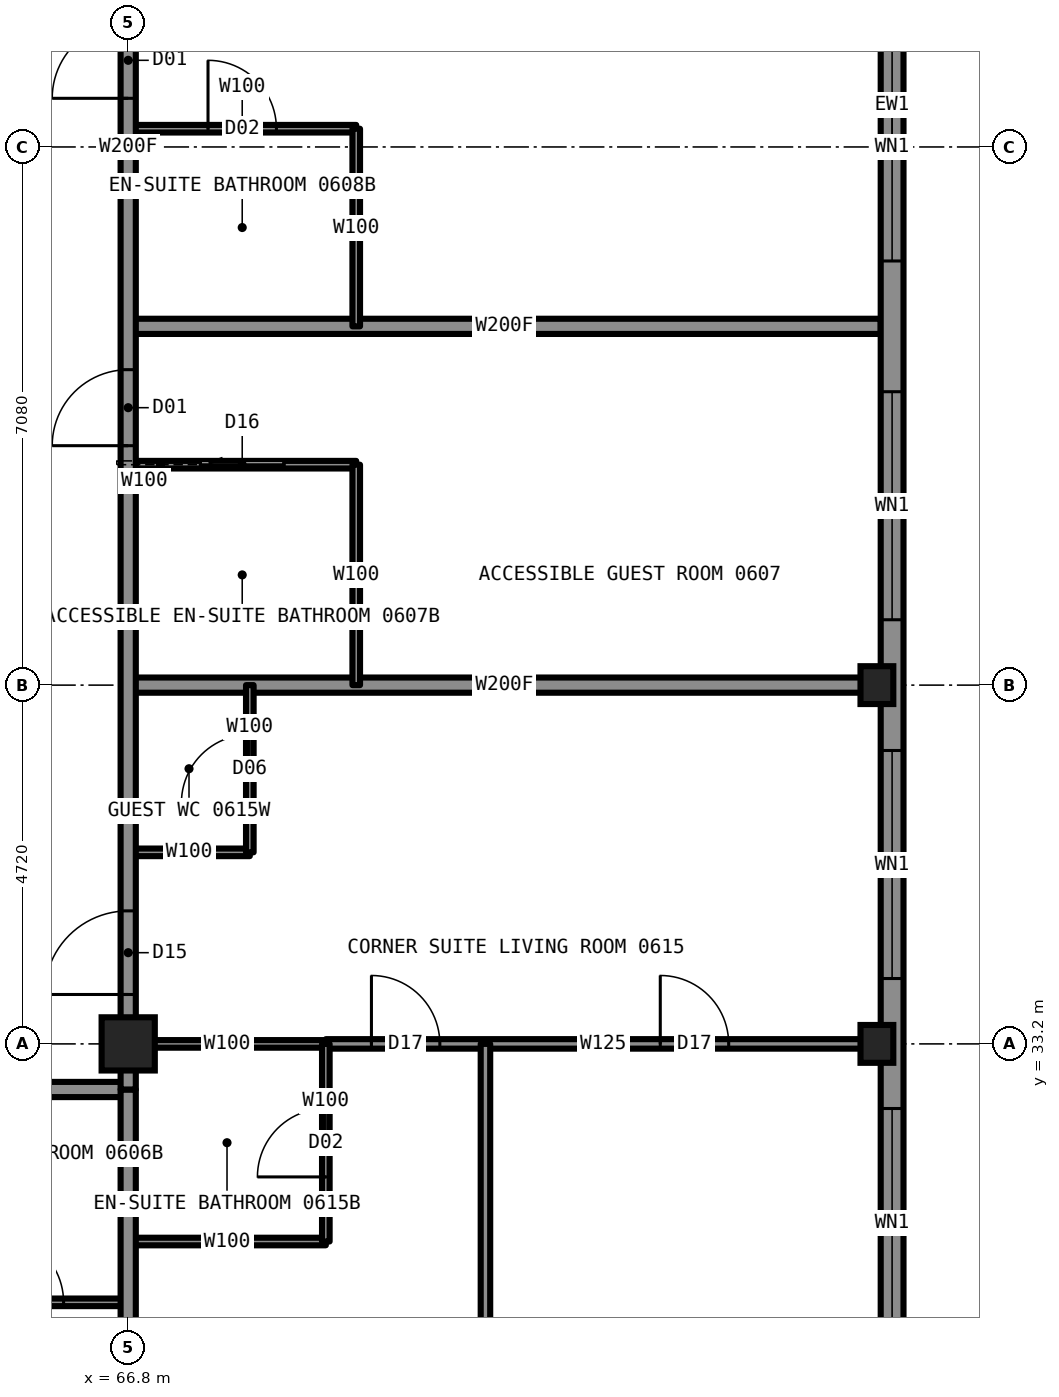
"""IFC4 building model, lengths in metres.
Left out: names, types, materials, properties, quantities, classifications, styles, units other than length and angle.
Written with IfcOpenShell. Run it as: python <this file> out.ifc"""

import sys

from ifc_helpers import new_model, si_unit, direction, frame, frame_2d, origin, origin_2d, place, context, subcontext, project, spatial, rectangle, hollow_rectangle, i_section, extrude, element, fill, save


model = new_model("IFC4")
c1 = context("Model", 3, precision=1e-05, world=origin(), true_north=direction((0.0, 1.0)))
c2 = subcontext(c1, "Body", "Model", "MODEL_VIEW")
j1 = project(units=[si_unit("LENGTHUNIT", "METRE"), si_unit("PLANEANGLEUNIT", "RADIAN")], contexts=[c1])
p1 = place(None, origin())
s1 = spatial("IfcSite", under=j1, at=p1, CompositionType="ELEMENT")
p2 = place(p1, origin())
s2 = spatial("IfcBuilding", under=s1, at=p2, CompositionType="ELEMENT")
p3 = place(p2, frame((0.0, 0.0, 28.5)))
s3 = spatial("IfcBuildingStorey", under=s2, at=p3, CompositionType="ELEMENT", Elevation=28.5)
for number, where, z_axis, x_axis in (
    (1, (76.65, 33.2, 0.0), (0.0, 0.0, 1.0), (1.0, 0.0, 0.0)),
    (2, (76.65, 37.92, 0.0), (0.0, 0.0, 1.0), (1.0, 0.0, 0.0)),
):
    element("IfcColumn", number, at=place(p3, frame(where, z_axis=z_axis, x_axis=x_axis)), inside=s3, PredefinedType="COLUMN", context=c2, shape_type="SweptSolid", body=[
        extrude(i_section(OverallWidth=0.432, OverallDepth=0.498, WebThickness=0.056, FlangeThickness=0.089, at=origin_2d()), origin(), (0.0, 0.0, 1.0), 3.5),
    ])
p4 = place(p3, frame((66.8, 33.2, 0.0), z_axis=(0.0, 0.0, 1.0), x_axis=(1.0, 0.0, 0.0)))
e3 = element("IfcColumn", 3, at=p4, inside=s3, PredefinedType="COLUMN", context=c2, shape_type="SweptSolid", body=[
    extrude(hollow_rectangle(XDim=0.7, YDim=0.7, WallThickness=0.06, at=origin_2d()), origin(), (0.0, 0.0, 1.0), 3.5),
])
p5 = place(p3, frame((66.8, 33.2, 0.0), z_axis=(0.0, 0.0, 1.0), x_axis=(1.0, 0.0, 0.0)))
e4 = element("IfcWall", 4, at=p5, inside=s3, PredefinedType="PARTITIONING", context=c2, shape_type="SweptSolid", body=[
    extrude(rectangle(XDim=2.6, YDim=0.1, at=frame_2d((1.3, 0.0))), origin(), (0.0, 0.0, 1.0), 2.573),
])
p6 = place(p3, frame((69.4, 33.2, 0.0), z_axis=(0.0, 0.0, 1.0), x_axis=(1.0, 0.0, 0.0)))
e5 = element("IfcWall", 5, at=p6, inside=s3, PredefinedType="PARTITIONING", context=c2, shape_type="SweptSolid", body=[
    extrude(rectangle(XDim=7.3, YDim=0.125, at=frame_2d((3.65, 0.0))), origin(), (0.0, 0.0, 1.0), 2.573),
])
p7 = place(p6, frame((0.6, 0.0, 0.0)))
e6 = element("IfcOpeningElement", 6, at=p7, cuts=e5, PredefinedType="OPENING", context=c2, shape_type="SweptSolid", body=[
    extrude(rectangle(XDim=0.9, YDim=2.2, at=frame_2d((0.45, 1.1))), frame((0.0, 0.073, 0.0), z_axis=(0.0, -1.0, 0.0), x_axis=(1.0, 0.0, 0.0)), (0.0, 0.0, 1.0), 0.145),
])
p8 = place(p6, frame((4.4, 0.0, 0.0)))
e7 = element("IfcOpeningElement", 7, at=p8, cuts=e5, PredefinedType="OPENING", context=c2, shape_type="SweptSolid", body=[
    extrude(rectangle(XDim=0.9, YDim=2.2, at=frame_2d((0.45, 1.1))), frame((0.0, 0.073, 0.0), z_axis=(0.0, -1.0, 0.0), x_axis=(1.0, 0.0, 0.0)), (0.0, 0.0, 1.0), 0.145),
])
p9 = place(p3, frame((43.2, 32.6, 0.0), z_axis=(0.0, 0.0, 1.0), x_axis=(1.0, 0.0, 0.0)))
e8 = element("IfcWall", 8, at=p9, inside=s3, PredefinedType="PARTITIONING", context=c2, shape_type="SweptSolid", body=[
    extrude(rectangle(XDim=23.6, YDim=0.2, at=frame_2d((11.8, 0.0))), origin(), (0.0, 0.0, 1.0), 3.33),
])
p10 = place(p9, frame((1.85, 0.0, 0.0)))
e9 = element("IfcOpeningElement", 9, at=p10, cuts=e8, PredefinedType="OPENING", context=c2, shape_type="SweptSolid", body=[
    extrude(rectangle(XDim=1.1, YDim=2.2, at=frame_2d((0.55, 1.1))), frame((0.0, 0.11, 0.0), z_axis=(0.0, -1.0, 0.0), x_axis=(1.0, 0.0, 0.0)), (0.0, 0.0, 1.0), 0.22),
])
p11 = place(p9, frame((14.56, 0.0, 0.0)))
e10 = element("IfcOpeningElement", 10, at=p11, cuts=e8, PredefinedType="OPENING", context=c2, shape_type="SweptSolid", body=[
    extrude(rectangle(XDim=1.0, YDim=2.2, at=frame_2d((0.5, 1.1))), frame((0.0, 0.11, 0.0), z_axis=(0.0, -1.0, 0.0), x_axis=(1.0, 0.0, 0.0)), (0.0, 0.0, 1.0), 0.22),
])
p12 = place(p9, frame((19.28, 0.0, 0.0)))
e11 = element("IfcOpeningElement", 11, at=p12, cuts=e8, PredefinedType="OPENING", context=c2, shape_type="SweptSolid", body=[
    extrude(rectangle(XDim=1.0, YDim=2.2, at=frame_2d((0.5, 1.1))), frame((0.0, 0.11, 0.0), z_axis=(0.0, -1.0, 0.0), x_axis=(1.0, 0.0, 0.0)), (0.0, 0.0, 1.0), 0.22),
])
p13 = place(p3, frame((66.8, 30.6, 0.0), z_axis=(0.0, 0.0, 1.0), x_axis=(1.0, 0.0, 0.0)))
e12 = element("IfcWall", 12, at=p13, inside=s3, PredefinedType="PARTITIONING", context=c2, shape_type="SweptSolid", body=[
    extrude(rectangle(XDim=2.6, YDim=0.1, at=frame_2d((1.3, 0.0))), origin(), (0.0, 0.0, 1.0), 3.33),
])
p14 = place(p3, frame((64.2, 29.8, 0.0), z_axis=(0.0, 0.0, 1.0), x_axis=(1.0, 0.0, 0.0)))
e13 = element("IfcWall", 13, at=p14, inside=s3, PredefinedType="PARTITIONING", context=c2, shape_type="SweptSolid", body=[
    extrude(rectangle(XDim=2.6, YDim=0.1, at=frame_2d((1.3, 0.0))), origin(), (0.0, 0.0, 1.0), 3.33),
])
p15 = place(p14, frame((0.85, 0.0, 0.0)))
e14 = element("IfcOpeningElement", 14, at=p15, cuts=e13, PredefinedType="OPENING", context=c2, shape_type="SweptSolid", body=[
    extrude(rectangle(XDim=0.9, YDim=2.1, at=frame_2d((0.45, 1.05))), frame((0.0, 0.06, 0.0), z_axis=(0.0, -1.0, 0.0), x_axis=(1.0, 0.0, 0.0)), (0.0, 0.0, 1.0), 0.12),
])
p16 = place(p3, frame((66.8, 42.64, 0.0), z_axis=(0.0, 0.0, 1.0), x_axis=(1.0, 0.0, 0.0)))
e15 = element("IfcWall", 15, at=p16, inside=s3, PredefinedType="PARTITIONING", context=c2, shape_type="SweptSolid", body=[
    extrude(rectangle(XDim=9.9, YDim=0.2, at=frame_2d((4.95, 0.0))), origin(), (0.0, 0.0, 1.0), 2.723),
])
p17 = place(p3, frame((66.8, 40.82, 0.0), z_axis=(0.0, 0.0, 1.0), x_axis=(1.0, 0.0, 0.0)))
e16 = element("IfcWall", 16, at=p17, inside=s3, PredefinedType="PARTITIONING", context=c2, shape_type="SweptSolid", body=[
    extrude(rectangle(XDim=3.0, YDim=0.1, at=frame_2d((1.5, 0.0))), origin(), (0.0, 0.0, 1.0), 3.33),
])
p18 = place(p17, frame((0.95, 0.0, 0.0)))
e17 = element("IfcOpeningElement", 17, at=p18, cuts=e16, PredefinedType="OPENING", context=c2, shape_type="SweptSolid", body=[
    extrude(rectangle(XDim=1.1, YDim=2.1, at=frame_2d((0.55, 1.05))), frame((0.0, 0.06, 0.0), z_axis=(0.0, -1.0, 0.0), x_axis=(1.0, 0.0, 0.0)), (0.0, 0.0, 1.0), 0.12),
])
p19 = place(p3, frame((66.8, 37.92, 0.0), z_axis=(0.0, 0.0, 1.0), x_axis=(1.0, 0.0, 0.0)))
e18 = element("IfcWall", 18, at=p19, inside=s3, PredefinedType="PARTITIONING", context=c2, shape_type="SweptSolid", body=[
    extrude(rectangle(XDim=9.9, YDim=0.2, at=frame_2d((4.95, 0.0))), origin(), (0.0, 0.0, 1.0), 2.573),
])
p20 = place(p3, frame((66.8, 35.72, 0.0), z_axis=(0.0, 0.0, 1.0), x_axis=(1.0, 0.0, 0.0)))
e19 = element("IfcWall", 19, at=p20, inside=s3, PredefinedType="PARTITIONING", context=c2, shape_type="SweptSolid", body=[
    extrude(rectangle(XDim=1.6, YDim=0.1, at=frame_2d((0.8, 0.0))), origin(), (0.0, 0.0, 1.0), 2.723),
])
p21 = place(p3, frame((66.8, 45.24, 0.0), z_axis=(0.0, 0.0, 1.0), x_axis=(1.0, 0.0, 0.0)))
e20 = element("IfcWall", 20, at=p21, inside=s3, PredefinedType="PARTITIONING", context=c2, shape_type="SweptSolid", body=[
    extrude(rectangle(XDim=3.0, YDim=0.1, at=frame_2d((1.5, 0.0))), origin(), (0.0, 0.0, 1.0), 3.33),
])
p22 = place(p21, frame((1.05, 0.0, 0.0)))
e21 = element("IfcOpeningElement", 21, at=p22, cuts=e20, PredefinedType="OPENING", context=c2, shape_type="SweptSolid", body=[
    extrude(rectangle(XDim=0.9, YDim=2.1, at=frame_2d((0.45, 1.05))), frame((0.0, 0.06, 0.0), z_axis=(0.0, -1.0, 0.0), x_axis=(1.0, 0.0, 0.0)), (0.0, 0.0, 1.0), 0.12),
])
p23 = place(p3, frame((66.8, 33.22, 0.0), z_axis=(0.0, 0.0, 1.0), x_axis=(0.0, 1.0, 0.0)))
e22 = element("IfcWall", 22, at=p23, inside=s3, PredefinedType="PARTITIONING", context=c2, shape_type="SweptSolid", body=[
    extrude(rectangle(XDim=23.56, YDim=0.2, at=frame_2d((11.78, 0.0))), origin(), (0.0, 0.0, 1.0), 3.33),
])
p24 = place(p23, frame((7.85, 0.0, 0.0)))
e23 = element("IfcOpeningElement", 23, at=p24, cuts=e22, PredefinedType="OPENING", context=c2, shape_type="SweptSolid", body=[
    extrude(rectangle(XDim=1.0, YDim=2.2, at=frame_2d((0.5, 1.1))), frame((0.0, 0.11, 0.0), z_axis=(0.0, -1.0, 0.0), x_axis=(1.0, 0.0, 0.0)), (0.0, 0.0, 1.0), 0.22),
])
p25 = place(p23, frame((12.42, 0.0, 0.0)))
e24 = element("IfcOpeningElement", 24, at=p25, cuts=e22, PredefinedType="OPENING", context=c2, shape_type="SweptSolid", body=[
    extrude(rectangle(XDim=1.0, YDim=2.2, at=frame_2d((0.5, 1.1))), frame((0.0, 0.11, 0.0), z_axis=(0.0, -1.0, 0.0), x_axis=(1.0, 0.0, 0.0)), (0.0, 0.0, 1.0), 0.22),
])
p26 = place(p23, frame((21.83, 0.0, 0.0)))
e25 = element("IfcOpeningElement", 25, at=p26, cuts=e22, PredefinedType="OPENING", context=c2, shape_type="SweptSolid", body=[
    extrude(rectangle(XDim=1.1, YDim=2.2, at=frame_2d((0.55, 1.1))), frame((0.0, 0.11, 0.0), z_axis=(0.0, -1.0, 0.0), x_axis=(1.0, 0.0, 0.0)), (0.0, 0.0, 1.0), 0.22),
])
p27 = place(p23, frame((0.63, 0.0, 0.0)))
e26 = element("IfcOpeningElement", 26, at=p27, cuts=e22, PredefinedType="OPENING", context=c2, shape_type="SweptSolid", body=[
    extrude(rectangle(XDim=1.1, YDim=2.2, at=frame_2d((0.55, 1.1))), frame((0.0, 0.11, 0.0), z_axis=(0.0, -1.0, 0.0), x_axis=(1.0, 0.0, 0.0)), (0.0, 0.0, 1.0), 0.22),
])
p28 = place(p3, frame((66.8, 23.3, 0.0), z_axis=(0.0, 0.0, 1.0), x_axis=(0.0, 1.0, 0.0)))
e27 = element("IfcWall", 27, at=p28, inside=s3, PredefinedType="PARTITIONING", context=c2, shape_type="SweptSolid", body=[
    extrude(rectangle(XDim=9.3, YDim=0.2, at=frame_2d((4.65, 0.0))), origin(), (0.0, 0.0, 1.0), 2.573),
])
p29 = place(p3, frame((68.4, 35.72, 0.0), z_axis=(0.0, 0.0, 1.0), x_axis=(0.0, 1.0, 0.0)))
e28 = element("IfcWall", 28, at=p29, inside=s3, PredefinedType="PARTITIONING", context=c2, shape_type="SweptSolid", body=[
    extrude(rectangle(XDim=2.2, YDim=0.1, at=frame_2d((1.1, 0.0))), origin(), (0.0, 0.0, 1.0), 3.33),
])
p30 = place(p29, frame((0.65, 0.0, 0.0)))
e29 = element("IfcOpeningElement", 29, at=p30, cuts=e28, PredefinedType="OPENING", context=c2, shape_type="SweptSolid", body=[
    extrude(rectangle(XDim=0.9, YDim=2.1, at=frame_2d((0.45, 1.05))), frame((0.0, 0.06, 0.0), z_axis=(0.0, -1.0, 0.0), x_axis=(1.0, 0.0, 0.0)), (0.0, 0.0, 1.0), 0.12),
])
p31 = place(p3, frame((69.4, 30.6, 0.0), z_axis=(0.0, 0.0, 1.0), x_axis=(0.0, 1.0, 0.0)))
e30 = element("IfcWall", 30, at=p31, inside=s3, PredefinedType="PARTITIONING", context=c2, shape_type="SweptSolid", body=[
    extrude(rectangle(XDim=2.6, YDim=0.1, at=frame_2d((1.3, 0.0))), origin(), (0.0, 0.0, 1.0), 3.33),
])
p32 = place(p31, frame((0.85, 0.0, 0.0)))
e31 = element("IfcOpeningElement", 31, at=p32, cuts=e30, PredefinedType="OPENING", context=c2, shape_type="SweptSolid", body=[
    extrude(rectangle(XDim=0.9, YDim=2.1, at=frame_2d((0.45, 1.05))), frame((0.0, 0.06, 0.0), z_axis=(0.0, -1.0, 0.0), x_axis=(1.0, 0.0, 0.0)), (0.0, 0.0, 1.0), 0.12),
])
p33 = place(p3, frame((69.8, 37.92, 0.0), z_axis=(0.0, 0.0, 1.0), x_axis=(0.0, 1.0, 0.0)))
e32 = element("IfcWall", 32, at=p33, inside=s3, PredefinedType="PARTITIONING", context=c2, shape_type="SweptSolid", body=[
    extrude(rectangle(XDim=2.9, YDim=0.1, at=frame_2d((1.45, 0.0))), origin(), (0.0, 0.0, 1.0), 3.33),
])
p34 = place(p3, frame((69.8, 42.64, 0.0), z_axis=(0.0, 0.0, 1.0), x_axis=(0.0, 1.0, 0.0)))
e33 = element("IfcWall", 33, at=p34, inside=s3, PredefinedType="PARTITIONING", context=c2, shape_type="SweptSolid", body=[
    extrude(rectangle(XDim=2.6, YDim=0.1, at=frame_2d((1.3, 0.0))), origin(), (0.0, 0.0, 1.0), 3.33),
])
p35 = place(p3, frame((71.5, 23.306, 0.0), z_axis=(0.0, 0.0, 1.0), x_axis=(0.0, 1.0, 0.0)))
e34 = element("IfcWall", 34, at=p35, inside=s3, PredefinedType="PARTITIONING", context=c2, shape_type="SweptSolid", body=[
    extrude(rectangle(XDim=9.894, YDim=0.125, at=frame_2d((4.947, 0.0))), origin(), (0.0, 0.0, 1.0), 3.33),
])
p36 = place(p3, frame((76.85, 28.5, 0.0), z_axis=(0.0, 0.0, 1.0), x_axis=(0.0, 1.0, 0.0)))
e35 = element("IfcWall", 35, at=p36, inside=s3, PredefinedType="SOLIDWALL", context=c2, shape_type="SweptSolid", body=[
    extrude(rectangle(XDim=33.0, YDim=0.3, at=frame_2d((16.5, 0.0))), origin(), (0.0, 0.0, 1.0), 2.83),
])
p37 = place(p36, frame((0.85, 0.0, 0.5)))
e36 = element("IfcOpeningElement", 36, at=p37, cuts=e35, PredefinedType="OPENING", context=c2, shape_type="SweptSolid", body=[
    extrude(rectangle(XDim=3.0, YDim=2.0, at=frame_2d((1.5, 1.0))), frame((0.0, 0.16, 0.0), z_axis=(0.0, -1.0, 0.0), x_axis=(1.0, 0.0, 0.0)), (0.0, 0.0, 1.0), 0.32),
])
p38 = place(p36, frame((5.56, 0.0, 0.5)))
e37 = element("IfcOpeningElement", 37, at=p38, cuts=e35, PredefinedType="OPENING", context=c2, shape_type="SweptSolid", body=[
    extrude(rectangle(XDim=3.0, YDim=2.0, at=frame_2d((1.5, 1.0))), frame((0.0, 0.16, 0.0), z_axis=(0.0, -1.0, 0.0), x_axis=(1.0, 0.0, 0.0)), (0.0, 0.0, 1.0), 0.32),
])
p39 = place(p36, frame((10.28, 0.0, 0.5)))
e38 = element("IfcOpeningElement", 38, at=p39, cuts=e35, PredefinedType="OPENING", context=c2, shape_type="SweptSolid", body=[
    extrude(rectangle(XDim=3.0, YDim=2.0, at=frame_2d((1.5, 1.0))), frame((0.0, 0.16, 0.0), z_axis=(0.0, -1.0, 0.0), x_axis=(1.0, 0.0, 0.0)), (0.0, 0.0, 1.0), 0.32),
])
p40 = place(p36, frame((15.0, 0.0, 0.5)))
e39 = element("IfcOpeningElement", 39, at=p40, cuts=e35, PredefinedType="OPENING", context=c2, shape_type="SweptSolid", body=[
    extrude(rectangle(XDim=3.0, YDim=2.0, at=frame_2d((1.5, 1.0))), frame((0.0, 0.16, 0.0), z_axis=(0.0, -1.0, 0.0), x_axis=(1.0, 0.0, 0.0)), (0.0, 0.0, 1.0), 0.32),
])
p41 = place(p36, frame((19.72, 0.0, 0.5)))
e40 = element("IfcOpeningElement", 40, at=p41, cuts=e35, PredefinedType="OPENING", context=c2, shape_type="SweptSolid", body=[
    extrude(rectangle(XDim=3.0, YDim=2.0, at=frame_2d((1.5, 1.0))), frame((0.0, 0.16, 0.0), z_axis=(0.0, -1.0, 0.0), x_axis=(1.0, 0.0, 0.0)), (0.0, 0.0, 1.0), 0.32),
])
p42 = place(p36, frame((24.44, 0.0, 0.5)))
e41 = element("IfcOpeningElement", 41, at=p42, cuts=e35, PredefinedType="OPENING", context=c2, shape_type="SweptSolid", body=[
    extrude(rectangle(XDim=3.0, YDim=2.0, at=frame_2d((1.5, 1.0))), frame((0.0, 0.16, 0.0), z_axis=(0.0, -1.0, 0.0), x_axis=(1.0, 0.0, 0.0)), (0.0, 0.0, 1.0), 0.32),
])
p43 = place(p36, frame((29.15, 0.0, 0.5)))
e42 = element("IfcOpeningElement", 42, at=p43, cuts=e35, PredefinedType="OPENING", context=c2, shape_type="SweptSolid", body=[
    extrude(rectangle(XDim=3.0, YDim=2.0, at=frame_2d((1.5, 1.0))), frame((0.0, 0.16, 0.0), z_axis=(0.0, -1.0, 0.0), x_axis=(1.0, 0.0, 0.0)), (0.0, 0.0, 1.0), 0.32),
])
p44 = place(p3, frame((66.8, 32.6, 0.0), z_axis=(0.0, 0.0, 1.0), x_axis=(0.0, 1.0, 0.0)))
e43 = element("IfcWall", 43, at=p44, inside=s3, PredefinedType="PARTITIONING", context=c2, shape_type="SweptSolid", body=[
    extrude(rectangle(XDim=0.62, YDim=0.2, at=frame_2d((0.31, 0.0))), origin(), (0.0, 0.0, 1.0), 2.573),
])
p45 = place(p15, origin())
e44 = element("IfcDoor", 44, at=p45, inside=s3, OperationType="SINGLE_SWING_RIGHT", PredefinedType="DOOR", context=c2, shape_type="SweptSolid", body=[
    extrude(rectangle(XDim=0.9, YDim=2.1, at=frame_2d((0.45, 1.05))), frame((0.0, 0.025, 0.0), z_axis=(0.0, -1.0, 0.0), x_axis=(1.0, 0.0, 0.0)), (0.0, 0.0, 1.0), 0.05),
])
fill(e14, e44)
p46 = place(p24, origin())
e45 = element("IfcDoor", 45, at=p46, inside=s3, OperationType="SINGLE_SWING_LEFT", PredefinedType="DOOR", context=c2, shape_type="SweptSolid", body=[
    extrude(rectangle(XDim=1.0, YDim=2.2, at=frame_2d((0.5, 1.1))), frame((0.0, 0.025, 0.0), z_axis=(0.0, -1.0, 0.0), x_axis=(1.0, 0.0, 0.0)), (0.0, 0.0, 1.0), 0.05),
])
fill(e23, e45)
p47 = place(p18, origin())
e46 = element("IfcDoor", 46, at=p47, inside=s3, OperationType="SLIDING_TO_LEFT", PredefinedType="DOOR", context=c2, shape_type="SweptSolid", body=[
    extrude(rectangle(XDim=1.1, YDim=2.1, at=frame_2d((0.55, 1.05))), frame((0.0, 0.025, 0.0), z_axis=(0.0, -1.0, 0.0), x_axis=(1.0, 0.0, 0.0)), (0.0, 0.0, 1.0), 0.05),
])
fill(e17, e46)
p48 = place(p25, origin())
e47 = element("IfcDoor", 47, at=p48, inside=s3, OperationType="SINGLE_SWING_LEFT", PredefinedType="DOOR", context=c2, shape_type="SweptSolid", body=[
    extrude(rectangle(XDim=1.0, YDim=2.2, at=frame_2d((0.5, 1.1))), frame((0.0, 0.025, 0.0), z_axis=(0.0, -1.0, 0.0), x_axis=(1.0, 0.0, 0.0)), (0.0, 0.0, 1.0), 0.05),
])
fill(e24, e47)
p49 = place(p22, origin())
e48 = element("IfcDoor", 48, at=p49, inside=s3, OperationType="SINGLE_SWING_RIGHT", PredefinedType="DOOR", context=c2, shape_type="SweptSolid", body=[
    extrude(rectangle(XDim=0.9, YDim=2.1, at=frame_2d((0.45, 1.05))), frame((0.0, 0.025, 0.0), z_axis=(0.0, -1.0, 0.0), x_axis=(1.0, 0.0, 0.0)), (0.0, 0.0, 1.0), 0.05),
])
fill(e21, e48)
p50 = place(p27, origin())
e49 = element("IfcDoor", 49, at=p50, inside=s3, OperationType="SINGLE_SWING_LEFT", PredefinedType="DOOR", context=c2, shape_type="SweptSolid", body=[
    extrude(rectangle(XDim=1.1, YDim=2.2, at=frame_2d((0.55, 1.1))), frame((0.0, 0.025, 0.0), z_axis=(0.0, -1.0, 0.0), x_axis=(1.0, 0.0, 0.0)), (0.0, 0.0, 1.0), 0.05),
])
fill(e26, e49)
p51 = place(p32, origin())
e50 = element("IfcDoor", 50, at=p51, inside=s3, OperationType="SINGLE_SWING_RIGHT", PredefinedType="DOOR", context=c2, shape_type="SweptSolid", body=[
    extrude(rectangle(XDim=0.9, YDim=2.1, at=frame_2d((0.45, 1.05))), frame((0.0, 0.025, 0.0), z_axis=(0.0, -1.0, 0.0), x_axis=(1.0, 0.0, 0.0)), (0.0, 0.0, 1.0), 0.05),
])
fill(e31, e50)
p52 = place(p7, origin())
e51 = element("IfcDoor", 51, at=p52, inside=s3, OperationType="SINGLE_SWING_LEFT", PredefinedType="DOOR", context=c2, shape_type="SweptSolid", body=[
    extrude(rectangle(XDim=0.9, YDim=2.2, at=frame_2d((0.45, 1.1))), frame((0.0, 0.025, 0.0), z_axis=(0.0, -1.0, 0.0), x_axis=(1.0, 0.0, 0.0)), (0.0, 0.0, 1.0), 0.05),
])
fill(e6, e51)
p53 = place(p8, origin())
e52 = element("IfcDoor", 52, at=p53, inside=s3, OperationType="SINGLE_SWING_LEFT", PredefinedType="DOOR", context=c2, shape_type="SweptSolid", body=[
    extrude(rectangle(XDim=0.9, YDim=2.2, at=frame_2d((0.45, 1.1))), frame((0.0, 0.025, 0.0), z_axis=(0.0, -1.0, 0.0), x_axis=(1.0, 0.0, 0.0)), (0.0, 0.0, 1.0), 0.05),
])
fill(e7, e52)
p54 = place(p30, origin())
e53 = element("IfcDoor", 53, at=p54, inside=s3, OperationType="SINGLE_SWING_LEFT", PredefinedType="DOOR", context=c2, shape_type="SweptSolid", body=[
    extrude(rectangle(XDim=0.9, YDim=2.1, at=frame_2d((0.45, 1.05))), frame((0.0, 0.025, 0.0), z_axis=(0.0, -1.0, 0.0), x_axis=(1.0, 0.0, 0.0)), (0.0, 0.0, 1.0), 0.05),
])
fill(e29, e53)
p55 = place(p37, origin())
e54 = element("IfcWindow", 54, at=p55, inside=s3, PartitioningType="SINGLE_PANEL", PredefinedType="WINDOW", context=c2, shape_type="SweptSolid", body=[
    extrude(rectangle(XDim=3.0, YDim=2.0, at=frame_2d((1.5, 1.0))), frame((0.0, 0.03, 0.0), z_axis=(0.0, -1.0, 0.0), x_axis=(1.0, 0.0, 0.0)), (0.0, 0.0, 1.0), 0.06),
])
fill(e36, e54)
p56 = place(p38, origin())
e55 = element("IfcWindow", 55, at=p56, inside=s3, PartitioningType="SINGLE_PANEL", PredefinedType="WINDOW", context=c2, shape_type="SweptSolid", body=[
    extrude(rectangle(XDim=3.0, YDim=2.0, at=frame_2d((1.5, 1.0))), frame((0.0, 0.03, 0.0), z_axis=(0.0, -1.0, 0.0), x_axis=(1.0, 0.0, 0.0)), (0.0, 0.0, 1.0), 0.06),
])
fill(e37, e55)
p57 = place(p39, origin())
e56 = element("IfcWindow", 56, at=p57, inside=s3, PartitioningType="SINGLE_PANEL", PredefinedType="WINDOW", context=c2, shape_type="SweptSolid", body=[
    extrude(rectangle(XDim=3.0, YDim=2.0, at=frame_2d((1.5, 1.0))), frame((0.0, 0.03, 0.0), z_axis=(0.0, -1.0, 0.0), x_axis=(1.0, 0.0, 0.0)), (0.0, 0.0, 1.0), 0.06),
])
fill(e38, e56)
p58 = place(p40, origin())
e57 = element("IfcWindow", 57, at=p58, inside=s3, PartitioningType="SINGLE_PANEL", PredefinedType="WINDOW", context=c2, shape_type="SweptSolid", body=[
    extrude(rectangle(XDim=3.0, YDim=2.0, at=frame_2d((1.5, 1.0))), frame((0.0, 0.03, 0.0), z_axis=(0.0, -1.0, 0.0), x_axis=(1.0, 0.0, 0.0)), (0.0, 0.0, 1.0), 0.06),
])
fill(e39, e57)
save(model, sys.argv[1])
